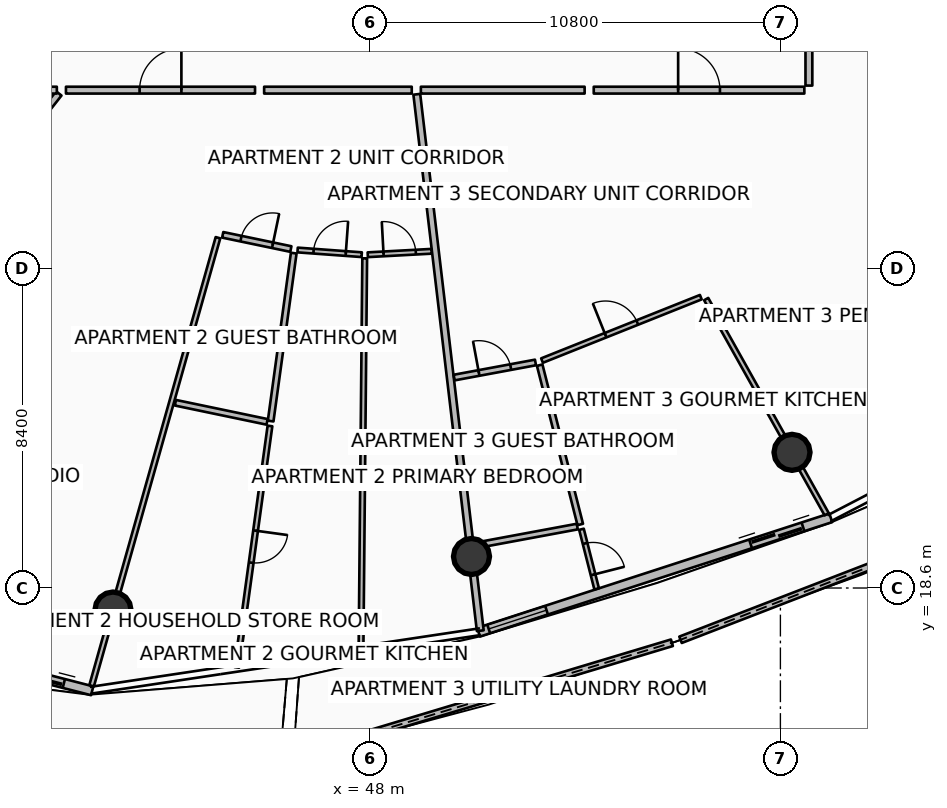
"""IFC4 building model, lengths in metres.
Left out: names, types, materials, properties, quantities, classifications, styles, units other than length and angle.
Written with IfcOpenShell. Run it as: python <this file> out.ifc"""

import sys

from ifc_helpers import new_model, si_unit, direction, frame, frame_2d, origin, origin_2d, place, context, subcontext, project, spatial, polyline, rectangle, circle, outline, extrude, element, fill, save


model = new_model("IFC4")
c1 = context("Model", 3, precision=1e-05, world=origin(), true_north=direction((0.0, 1.0)))
c2 = subcontext(c1, "Body", "Model", "MODEL_VIEW")
j1 = project(units=[si_unit("LENGTHUNIT", "METRE"), si_unit("PLANEANGLEUNIT", "RADIAN")], contexts=[c1])
p1 = place(None, origin())
s1 = spatial("IfcSite", under=j1, at=p1, CompositionType="ELEMENT")
p2 = place(p1, origin())
s2 = spatial("IfcBuilding", under=s1, at=p2, CompositionType="ELEMENT")
p3 = place(p2, frame((0.0, 0.0, 275.2)))
s3 = spatial("IfcBuildingStorey", under=s2, at=p3, CompositionType="ELEMENT", Elevation=275.2)
for number, where, z_axis, x_axis in (
    (1, (41.237, 18.021, 0.0), (0.0, 0.0, 1.0), (1.0, 0.0, 0.0)),
    (2, (50.671, 19.429, 0.0), (0.0, 0.0, 1.0), (1.0, 0.0, 0.0)),
    (3, (59.105, 22.17, 0.0), (0.0, 0.0, 1.0), (1.0, 0.0, 0.0)),
):
    element("IfcColumn", number, at=place(p3, frame(where, z_axis=z_axis, x_axis=x_axis)), inside=s3, PredefinedType="COLUMN", context=c2, shape_type="SweptSolid", body=[
        extrude(circle(Radius=0.475, at=origin_2d()), origin(), (0.0, 0.0, 1.0), 3.59),
    ])
p4 = place(p3, frame((45.98, 14.164, 0.0), z_axis=(0.0, 0.0, 1.0), x_axis=(0.957650459476, 0.287933321214, 0.0)))
e4 = element("IfcWall", 4, at=p4, inside=s3, PredefinedType="PARAPET", context=c2, shape_type="SweptSolid", body=[
    extrude(outline(polyline([(0.0, 0.0), (10.406, 0.0), (10.406, 1.148), (5.203, 1.284), (0.0, 1.483), (0.0, 0.0)])), frame((0.0, 0.09, 0.0), z_axis=(0.0, -1.0, 0.0), x_axis=(1.0, 0.0, 0.0)), (0.0, 0.0, 1.0), 0.18),
])
p5 = place(p3, frame((56.172, 17.238, 0.0), z_axis=(0.0, 0.0, 1.0), x_axis=(0.9326848715, 0.36069229334, 0.0)))
e5 = element("IfcWall", 5, at=p5, inside=s3, PredefinedType="PARAPET", context=c2, shape_type="SweptSolid", body=[
    extrude(outline(polyline([(0.0, 0.0), (10.281, 0.0), (10.281, 1.224), (5.14, 1.127), (0.0, 1.148), (0.0, 0.0)])), frame((0.0, 0.09, 0.0), z_axis=(0.0, -1.0, 0.0), x_axis=(1.0, 0.0, 0.0)), (0.0, 0.0, 1.0), 0.18),
])
p6 = place(p3, frame((29.614, 18.751, 0.0), z_axis=(0.0, 0.0, 1.0), x_axis=(0.968343758421, -0.249620442927, 0.0)))
e6 = element("IfcWall", 6, at=p6, inside=s3, PredefinedType="SOLIDWALL", context=c2, shape_type="SweptSolid", body=[
    extrude(rectangle(XDim=11.438, YDim=0.24, at=frame_2d((5.719, 0.0))), origin(), (0.0, 0.0, 1.0), 2.54),
])
p7 = place(p6, frame((9.218, 0.0, 0.0)))
e7 = element("IfcOpeningElement", 7, at=p7, cuts=e6, PredefinedType="OPENING", context=c2, shape_type="SweptSolid", body=[
    extrude(rectangle(XDim=1.45, YDim=2.15, at=frame_2d((0.725, 1.075))), frame((0.0, 0.13, 0.0), z_axis=(0.0, -1.0, 0.0), x_axis=(1.0, 0.0, 0.0)), (0.0, 0.0, 1.0), 0.26),
])
p8 = place(p6, frame((0.28, 0.0, 0.65)))
e8 = element("IfcOpeningElement", 8, at=p8, cuts=e6, PredefinedType="OPENING", context=c2, shape_type="SweptSolid", body=[
    extrude(rectangle(XDim=1.6, YDim=1.5, at=frame_2d((0.8, 0.75))), frame((0.0, 0.13, 0.0), z_axis=(0.0, -1.0, 0.0), x_axis=(1.0, 0.0, 0.0)), (0.0, 0.0, 1.0), 0.26),
])
p9 = place(p3, frame((50.858, 17.436, 0.0), z_axis=(0.0, 0.0, 1.0), x_axis=(0.951055974609, 0.309018661507, 0.0)))
e9 = element("IfcWall", 9, at=p9, inside=s3, PredefinedType="SOLIDWALL", context=c2, shape_type="SweptSolid", body=[
    extrude(rectangle(XDim=9.745, YDim=0.24, at=frame_2d((4.873, 0.0))), origin(), (0.0, 0.0, 1.0), 2.54),
])
p10 = place(p9, frame((7.525, 0.0, 0.0)))
e10 = element("IfcOpeningElement", 10, at=p10, cuts=e9, PredefinedType="OPENING", context=c2, shape_type="SweptSolid", body=[
    extrude(rectangle(XDim=1.45, YDim=2.15, at=frame_2d((0.725, 1.075))), frame((0.0, 0.13, 0.0), z_axis=(0.0, -1.0, 0.0), x_axis=(1.0, 0.0, 0.0)), (0.0, 0.0, 1.0), 0.26),
])
p11 = place(p9, frame((0.28, 0.0, 0.65)))
e11 = element("IfcOpeningElement", 11, at=p11, cuts=e9, PredefinedType="OPENING", context=c2, shape_type="SweptSolid", body=[
    extrude(rectangle(XDim=1.6, YDim=1.5, at=frame_2d((0.8, 0.75))), frame((0.0, 0.13, 0.0), z_axis=(0.0, -1.0, 0.0), x_axis=(1.0, 0.0, 0.0)), (0.0, 0.0, 1.0), 0.26),
])
p12 = place(p3, frame((39.812, 31.614, 0.0), z_axis=(0.0, 0.0, 1.0), x_axis=(-0.619097230176, -0.785314344443, 0.0)))
e12 = element("IfcWall", 12, at=p12, inside=s3, PredefinedType="PARTITIONING", context=c2, shape_type="SweptSolid", body=[
    extrude(rectangle(XDim=16.37, YDim=0.18, at=frame_2d((8.185, 0.0))), origin(), (0.0, 0.0, 1.0), 2.957),
])
p13 = place(p3, frame((49.232, 31.591, 0.0), z_axis=(0.0, 0.0, 1.0), x_axis=(0.117545848714, -0.993067456646, 0.0)))
e13 = element("IfcWall", 13, at=p13, inside=s3, PredefinedType="PARTITIONING", context=c2, shape_type="SweptSolid", body=[
    extrude(rectangle(XDim=14.213, YDim=0.18, at=frame_2d((7.106, 0.0))), origin(), (0.0, 0.0, 1.0), 2.957),
])
p14 = place(p3, frame((37.42, 31.7, 0.0), z_axis=(0.0, 0.0, 1.0), x_axis=(1.0, 0.0, 0.0)))
e14 = element("IfcWall", 14, at=p14, inside=s3, PredefinedType="PARTITIONING", context=c2, shape_type="SweptSolid", body=[
    extrude(rectangle(XDim=2.34, YDim=0.18, at=frame_2d((1.17, 0.0))), origin(), (0.0, 0.0, 1.0), 2.957),
])
p15 = place(p3, frame((40.0, 31.7, 0.0), z_axis=(0.0, 0.0, 1.0), x_axis=(1.0, 0.0, 0.0)))
e15 = element("IfcWall", 15, at=p15, inside=s3, PredefinedType="PARTITIONING", context=c2, shape_type="SweptSolid", body=[
    extrude(rectangle(XDim=4.975, YDim=0.18, at=frame_2d((2.488, 0.0))), origin(), (0.0, 0.0, 1.0), 2.957),
])
p16 = place(p15, frame((1.938, 0.0, 0.0)))
e16 = element("IfcOpeningElement", 16, at=p16, cuts=e15, PredefinedType="OPENING", context=c2, shape_type="SweptSolid", body=[
    extrude(rectangle(XDim=1.1, YDim=2.1, at=frame_2d((0.55, 1.05))), frame((0.0, 0.1, 0.0), z_axis=(0.0, -1.0, 0.0), x_axis=(1.0, 0.0, 0.0)), (0.0, 0.0, 1.0), 0.2),
])
p17 = place(p3, frame((45.215, 31.7, 0.0), z_axis=(0.0, 0.0, 1.0), x_axis=(1.0, 0.0, 0.0)))
e17 = element("IfcWall", 17, at=p17, inside=s3, PredefinedType="PARTITIONING", context=c2, shape_type="SweptSolid", body=[
    extrude(rectangle(XDim=3.884, YDim=0.18, at=frame_2d((1.942, 0.0))), origin(), (0.0, 0.0, 1.0), 2.957),
])
p18 = place(p3, frame((44.0, 27.817, 0.0), z_axis=(0.0, 0.0, 1.0), x_axis=(-0.271434127064, -0.962457019646, 0.0)))
e18 = element("IfcWall", 18, at=p18, inside=s3, PredefinedType="PARTITIONING", context=c2, shape_type="SweptSolid", body=[
    extrude(rectangle(XDim=12.249, YDim=0.125, at=frame_2d((6.125, 0.0))), origin(), (0.0, 0.0, 1.0), 2.957),
])
p19 = place(p3, frame((44.125, 27.893, 0.0), z_axis=(0.0, 0.0, 1.0), x_axis=(0.978900502262, -0.204337482294, 0.0)))
e19 = element("IfcWall", 19, at=p19, inside=s3, PredefinedType="PARTITIONING", context=c2, shape_type="SweptSolid", body=[
    extrude(rectangle(XDim=1.832, YDim=0.15, at=frame_2d((0.916, 0.0))), origin(), (0.0, 0.0, 1.0), 2.957),
])
p20 = place(p19, frame((0.491, 0.0, 0.0)))
e20 = element("IfcOpeningElement", 20, at=p20, cuts=e19, PredefinedType="OPENING", context=c2, shape_type="SweptSolid", body=[
    extrude(rectangle(XDim=0.85, YDim=2.06, at=frame_2d((0.425, 1.03))), frame((0.0, 0.085, 0.0), z_axis=(0.0, -1.0, 0.0), x_axis=(1.0, 0.0, 0.0)), (0.0, 0.0, 1.0), 0.17),
])
p21 = place(p3, frame((42.879, 23.475, 0.0), z_axis=(0.0, 0.0, 1.0), x_axis=(0.978912814884, -0.204278488479, 0.0)))
e21 = element("IfcWall", 21, at=p21, inside=s3, PredefinedType="PARTITIONING", context=c2, shape_type="SweptSolid", body=[
    extrude(rectangle(XDim=2.466, YDim=0.15, at=frame_2d((1.233, 0.0))), origin(), (0.0, 0.0, 1.0), 2.957),
])
p22 = place(p3, frame((45.994, 27.411, 0.0), z_axis=(0.0, 0.0, 1.0), x_axis=(-0.136246545396, -0.99067496126, 0.0)))
e22 = element("IfcWall", 22, at=p22, inside=s3, PredefinedType="PARTITIONING", context=c2, shape_type="SweptSolid", body=[
    extrude(rectangle(XDim=4.46, YDim=0.15, at=frame_2d((2.23, 0.0))), origin(), (0.0, 0.0, 1.0), 3.03),
])
p23 = place(p3, frame((45.368, 22.864, 0.0), z_axis=(0.0, 0.0, 1.0), x_axis=(-0.136200589596, -0.99068128043, 0.0)))
e23 = element("IfcWall", 23, at=p23, inside=s3, PredefinedType="PARTITIONING", context=c2, shape_type="SweptSolid", body=[
    extrude(rectangle(XDim=6.412, YDim=0.125, at=frame_2d((3.206, 0.0))), origin(), (0.0, 0.0, 1.0), 3.03),
])
p24 = place(p23, frame((2.781, 0.0, 0.0)))
e24 = element("IfcOpeningElement", 24, at=p24, cuts=e23, PredefinedType="OPENING", context=c2, shape_type="SweptSolid", body=[
    extrude(rectangle(XDim=0.85, YDim=2.06, at=frame_2d((0.425, 1.03))), frame((0.0, 0.073, 0.0), z_axis=(0.0, -1.0, 0.0), x_axis=(1.0, 0.0, 0.0)), (0.0, 0.0, 1.0), 0.145),
])
p25 = place(p3, frame((47.861, 27.275, 0.0), z_axis=(0.0, 0.0, 1.0), x_axis=(-0.009436905939, -0.999955471412, 0.0)))
e25 = element("IfcWall", 25, at=p25, inside=s3, PredefinedType="PARTITIONING", context=c2, shape_type="SweptSolid", body=[
    extrude(rectangle(XDim=10.271, YDim=0.125, at=frame_2d((5.135, 0.0))), origin(), (0.0, 0.0, 1.0), 3.03),
])
p26 = place(p3, frame((46.096, 27.494, 0.0), z_axis=(0.0, 0.0, 1.0), x_axis=(0.997337823183, -0.072919588925, 0.0)))
e26 = element("IfcWall", 26, at=p26, inside=s3, PredefinedType="PARTITIONING", context=c2, shape_type="SweptSolid", body=[
    extrude(rectangle(XDim=1.691, YDim=0.125, at=frame_2d((0.845, 0.0))), origin(), (0.0, 0.0, 1.0), 3.03),
])
p27 = place(p26, frame((0.42, 0.0, 0.0)))
e27 = element("IfcOpeningElement", 27, at=p27, cuts=e26, PredefinedType="OPENING", context=c2, shape_type="SweptSolid", body=[
    extrude(rectangle(XDim=0.85, YDim=2.06, at=frame_2d((0.425, 1.03))), frame((0.0, 0.073, 0.0), z_axis=(0.0, -1.0, 0.0), x_axis=(1.0, 0.0, 0.0)), (0.0, 0.0, 1.0), 0.145),
])
p28 = place(p3, frame((47.942, 27.369, 0.0), z_axis=(0.0, 0.0, 1.0), x_axis=(0.998523596101, 0.054319683628, 0.0)))
e28 = element("IfcWall", 28, at=p28, inside=s3, PredefinedType="PARTITIONING", context=c2, shape_type="SweptSolid", body=[
    extrude(rectangle(XDim=1.681, YDim=0.125, at=frame_2d((0.84, 0.0))), origin(), (0.0, 0.0, 1.0), 3.03),
])
p29 = place(p28, frame((0.415, 0.0, 0.0)))
e29 = element("IfcOpeningElement", 29, at=p29, cuts=e28, PredefinedType="OPENING", context=c2, shape_type="SweptSolid", body=[
    extrude(rectangle(XDim=0.85, YDim=2.06, at=frame_2d((0.425, 1.03))), frame((0.0, 0.073, 0.0), z_axis=(0.0, -1.0, 0.0), x_axis=(1.0, 0.0, 0.0)), (0.0, 0.0, 1.0), 0.145),
])
p30 = place(p3, frame((53.888, 31.7, 0.0), z_axis=(0.0, 0.0, 1.0), x_axis=(1.0, 0.0, 0.0)))
e30 = element("IfcWall", 30, at=p30, inside=s3, PredefinedType="PARTITIONING", context=c2, shape_type="SweptSolid", body=[
    extrude(rectangle(XDim=5.542, YDim=0.18, at=frame_2d((2.771, 0.0))), origin(), (0.0, 0.0, 1.0), 2.957),
])
p31 = place(p30, frame((2.221, 0.0, 0.0)))
e31 = element("IfcOpeningElement", 31, at=p31, cuts=e30, PredefinedType="OPENING", context=c2, shape_type="SweptSolid", body=[
    extrude(rectangle(XDim=1.1, YDim=2.1, at=frame_2d((0.55, 1.05))), frame((0.0, 0.1, 0.0), z_axis=(0.0, -1.0, 0.0), x_axis=(1.0, 0.0, 0.0)), (0.0, 0.0, 1.0), 0.2),
])
p32 = place(p3, frame((59.55, 31.82, 0.0), z_axis=(0.0, 0.0, 1.0), x_axis=(0.0, 1.0, 0.0)))
e32 = element("IfcWall", 32, at=p32, inside=s3, PredefinedType="PARTITIONING", context=c2, shape_type="SweptSolid", body=[
    extrude(rectangle(XDim=0.955, YDim=0.18, at=frame_2d((0.477, 0.0))), origin(), (0.0, 0.0, 1.0), 2.957),
])
p33 = place(p3, frame((49.339, 31.7, 0.0), z_axis=(0.0, 0.0, 1.0), x_axis=(1.0, 0.0, 0.0)))
e33 = element("IfcWall", 33, at=p33, inside=s3, PredefinedType="PARTITIONING", context=c2, shape_type="SweptSolid", body=[
    extrude(rectangle(XDim=4.309, YDim=0.18, at=frame_2d((2.155, 0.0))), origin(), (0.0, 0.0, 1.0), 2.957),
])
p34 = place(p3, frame((56.847, 26.203, 0.0), z_axis=(0.0, 0.0, 1.0), x_axis=(0.488636594114, -0.872487409017, 0.0)))
e34 = element("IfcWall", 34, at=p34, inside=s3, PredefinedType="PARTITIONING", context=c2, shape_type="SweptSolid", body=[
    extrude(rectangle(XDim=6.489, YDim=0.125, at=frame_2d((3.244, 0.0))), origin(), (0.0, 0.0, 1.0), 2.957),
])
p35 = place(p3, frame((50.215, 24.137, 0.0), z_axis=(0.0, 0.0, 1.0), x_axis=(0.983215758485, 0.182446628542, 0.0)))
e35 = element("IfcWall", 35, at=p35, inside=s3, PredefinedType="PARTITIONING", context=c2, shape_type="SweptSolid", body=[
    extrude(rectangle(XDim=2.177, YDim=0.15, at=frame_2d((1.089, 0.0))), origin(), (0.0, 0.0, 1.0), 2.957),
])
p36 = place(p35, frame((0.664, 0.0, 0.0)))
e36 = element("IfcOpeningElement", 36, at=p36, cuts=e35, PredefinedType="OPENING", context=c2, shape_type="SweptSolid", body=[
    extrude(rectangle(XDim=0.85, YDim=2.06, at=frame_2d((0.425, 1.03))), frame((0.0, 0.085, 0.0), z_axis=(0.0, -1.0, 0.0), x_axis=(1.0, 0.0, 0.0)), (0.0, 0.0, 1.0), 0.17),
])
p37 = place(p3, frame((50.738, 19.712, 0.0), z_axis=(0.0, 0.0, 1.0), x_axis=(0.983195760322, 0.18255436693, 0.0)))
e37 = element("IfcWall", 37, at=p37, inside=s3, PredefinedType="PARTITIONING", context=c2, shape_type="SweptSolid", body=[
    extrude(rectangle(XDim=2.763, YDim=0.15, at=frame_2d((1.381, 0.0))), origin(), (0.0, 0.0, 1.0), 2.957),
])
p38 = place(p3, frame((52.466, 24.464, 0.0), z_axis=(0.0, 0.0, 1.0), x_axis=(0.246795883472, -0.969067485731, 0.0)))
e38 = element("IfcWall", 38, at=p38, inside=s3, PredefinedType="PARTITIONING", context=c2, shape_type="SweptSolid", body=[
    extrude(rectangle(XDim=4.326, YDim=0.15, at=frame_2d((2.163, 0.0))), origin(), (0.0, 0.0, 1.0), 3.03),
])
p39 = place(p3, frame((53.565, 20.146, 0.0), z_axis=(0.0, 0.0, 1.0), x_axis=(0.24689818157, -0.969041427359, 0.0)))
e39 = element("IfcWall", 39, at=p39, inside=s3, PredefinedType="PARTITIONING", context=c2, shape_type="SweptSolid", body=[
    extrude(rectangle(XDim=1.619, YDim=0.125, at=frame_2d((0.809, 0.0))), origin(), (0.0, 0.0, 1.0), 3.03),
])
p40 = place(p39, frame((0.385, 0.0, 0.0)))
e40 = element("IfcOpeningElement", 40, at=p40, cuts=e39, PredefinedType="OPENING", context=c2, shape_type="SweptSolid", body=[
    extrude(rectangle(XDim=0.85, YDim=2.06, at=frame_2d((0.425, 1.03))), frame((0.0, 0.073, 0.0), z_axis=(0.0, -1.0, 0.0), x_axis=(1.0, 0.0, 0.0)), (0.0, 0.0, 1.0), 0.145),
])
p41 = place(p3, frame((52.527, 24.584, 0.0), z_axis=(0.0, 0.0, 1.0), x_axis=(0.928678664633, 0.370885343274, 0.0)))
e41 = element("IfcWall", 41, at=p41, inside=s3, PredefinedType="PARTITIONING", context=c2, shape_type="SweptSolid", body=[
    extrude(rectangle(XDim=4.499, YDim=0.125, at=frame_2d((2.249, 0.0))), origin(), (0.0, 0.0, 1.0), 2.957),
])
p42 = place(p41, frame((1.799, 0.0, 0.0)))
e42 = element("IfcOpeningElement", 42, at=p42, cuts=e41, PredefinedType="OPENING", context=c2, shape_type="SweptSolid", body=[
    extrude(rectangle(XDim=0.9, YDim=2.08, at=frame_2d((0.45, 1.04))), frame((0.0, 0.073, 0.0), z_axis=(0.0, -1.0, 0.0), x_axis=(1.0, 0.0, 0.0)), (0.0, 0.0, 1.0), 0.145),
])
p43 = place(p7, origin())
e43 = element("IfcDoor", 43, at=p43, inside=s3, OperationType="DOUBLE_DOOR_SLIDING", PredefinedType="DOOR", context=c2, shape_type="SweptSolid", body=[
    extrude(rectangle(XDim=1.45, YDim=2.15, at=frame_2d((0.725, 1.075))), frame((0.0, 0.025, 0.0), z_axis=(0.0, -1.0, 0.0), x_axis=(1.0, 0.0, 0.0)), (0.0, 0.0, 1.0), 0.05),
])
fill(e7, e43)
p44 = place(p10, origin())
e44 = element("IfcDoor", 44, at=p44, inside=s3, OperationType="DOUBLE_DOOR_SLIDING", PredefinedType="DOOR", context=c2, shape_type="SweptSolid", body=[
    extrude(rectangle(XDim=1.45, YDim=2.15, at=frame_2d((0.725, 1.075))), frame((0.0, 0.025, 0.0), z_axis=(0.0, -1.0, 0.0), x_axis=(1.0, 0.0, 0.0)), (0.0, 0.0, 1.0), 0.05),
])
fill(e10, e44)
p45 = place(p11, origin())
e45 = element("IfcWindow", 45, at=p45, inside=s3, PartitioningType="SINGLE_PANEL", PredefinedType="WINDOW", context=c2, shape_type="SweptSolid", body=[
    extrude(rectangle(XDim=1.6, YDim=1.5, at=frame_2d((0.8, 0.75))), frame((0.0, 0.03, 0.0), z_axis=(0.0, -1.0, 0.0), x_axis=(1.0, 0.0, 0.0)), (0.0, 0.0, 1.0), 0.06),
])
fill(e11, e45)
p46 = place(p16, origin())
e46 = element("IfcDoor", 46, at=p46, inside=s3, OperationType="SINGLE_SWING_RIGHT", PredefinedType="DOOR", context=c2, shape_type="SweptSolid", body=[
    extrude(rectangle(XDim=1.1, YDim=2.1, at=frame_2d((0.55, 1.05))), frame((0.0, 0.025, 0.0), z_axis=(0.0, -1.0, 0.0), x_axis=(1.0, 0.0, 0.0)), (0.0, 0.0, 1.0), 0.05),
])
fill(e16, e46)
p47 = place(p20, origin())
e47 = element("IfcDoor", 47, at=p47, inside=s3, OperationType="SINGLE_SWING_RIGHT", PredefinedType="DOOR", context=c2, shape_type="SweptSolid", body=[
    extrude(rectangle(XDim=0.85, YDim=2.06, at=frame_2d((0.425, 1.03))), frame((0.0, 0.025, 0.0), z_axis=(0.0, -1.0, 0.0), x_axis=(1.0, 0.0, 0.0)), (0.0, 0.0, 1.0), 0.05),
])
fill(e20, e47)
p48 = place(p24, origin())
e48 = element("IfcDoor", 48, at=p48, inside=s3, OperationType="SINGLE_SWING_LEFT", PredefinedType="DOOR", context=c2, shape_type="SweptSolid", body=[
    extrude(rectangle(XDim=0.85, YDim=2.06, at=frame_2d((0.425, 1.03))), frame((0.0, 0.025, 0.0), z_axis=(0.0, -1.0, 0.0), x_axis=(1.0, 0.0, 0.0)), (0.0, 0.0, 1.0), 0.05),
])
fill(e24, e48)
p49 = place(p27, origin())
e49 = element("IfcDoor", 49, at=p49, inside=s3, OperationType="SINGLE_SWING_RIGHT", PredefinedType="DOOR", context=c2, shape_type="SweptSolid", body=[
    extrude(rectangle(XDim=0.85, YDim=2.06, at=frame_2d((0.425, 1.03))), frame((0.0, 0.025, 0.0), z_axis=(0.0, -1.0, 0.0), x_axis=(1.0, 0.0, 0.0)), (0.0, 0.0, 1.0), 0.05),
])
fill(e27, e49)
p50 = place(p29, origin())
e50 = element("IfcDoor", 50, at=p50, inside=s3, OperationType="SINGLE_SWING_LEFT", PredefinedType="DOOR", context=c2, shape_type="SweptSolid", body=[
    extrude(rectangle(XDim=0.85, YDim=2.06, at=frame_2d((0.425, 1.03))), frame((0.0, 0.025, 0.0), z_axis=(0.0, -1.0, 0.0), x_axis=(1.0, 0.0, 0.0)), (0.0, 0.0, 1.0), 0.05),
])
fill(e29, e50)
p51 = place(p31, origin())
e51 = element("IfcDoor", 51, at=p51, inside=s3, OperationType="SINGLE_SWING_LEFT", PredefinedType="DOOR", context=c2, shape_type="SweptSolid", body=[
    extrude(rectangle(XDim=1.1, YDim=2.1, at=frame_2d((0.55, 1.05))), frame((0.0, 0.025, 0.0), z_axis=(0.0, -1.0, 0.0), x_axis=(1.0, 0.0, 0.0)), (0.0, 0.0, 1.0), 0.05),
])
fill(e31, e51)
p52 = place(p36, origin())
e52 = element("IfcDoor", 52, at=p52, inside=s3, OperationType="SINGLE_SWING_LEFT", PredefinedType="DOOR", context=c2, shape_type="SweptSolid", body=[
    extrude(rectangle(XDim=0.85, YDim=2.06, at=frame_2d((0.425, 1.03))), frame((0.0, 0.025, 0.0), z_axis=(0.0, -1.0, 0.0), x_axis=(1.0, 0.0, 0.0)), (0.0, 0.0, 1.0), 0.05),
])
fill(e36, e52)
p53 = place(p40, origin())
e53 = element("IfcDoor", 53, at=p53, inside=s3, OperationType="SINGLE_SWING_RIGHT", PredefinedType="DOOR", context=c2, shape_type="SweptSolid", body=[
    extrude(rectangle(XDim=0.85, YDim=2.06, at=frame_2d((0.425, 1.03))), frame((0.0, 0.025, 0.0), z_axis=(0.0, -1.0, 0.0), x_axis=(1.0, 0.0, 0.0)), (0.0, 0.0, 1.0), 0.05),
])
fill(e40, e53)
p54 = place(p42, origin())
e54 = element("IfcDoor", 54, at=p54, inside=s3, OperationType="SINGLE_SWING_LEFT", PredefinedType="DOOR", context=c2, shape_type="SweptSolid", body=[
    extrude(rectangle(XDim=0.9, YDim=2.08, at=frame_2d((0.45, 1.04))), frame((0.0, 0.025, 0.0), z_axis=(0.0, -1.0, 0.0), x_axis=(1.0, 0.0, 0.0)), (0.0, 0.0, 1.0), 0.05),
])
fill(e42, e54)
save(model, sys.argv[1])
